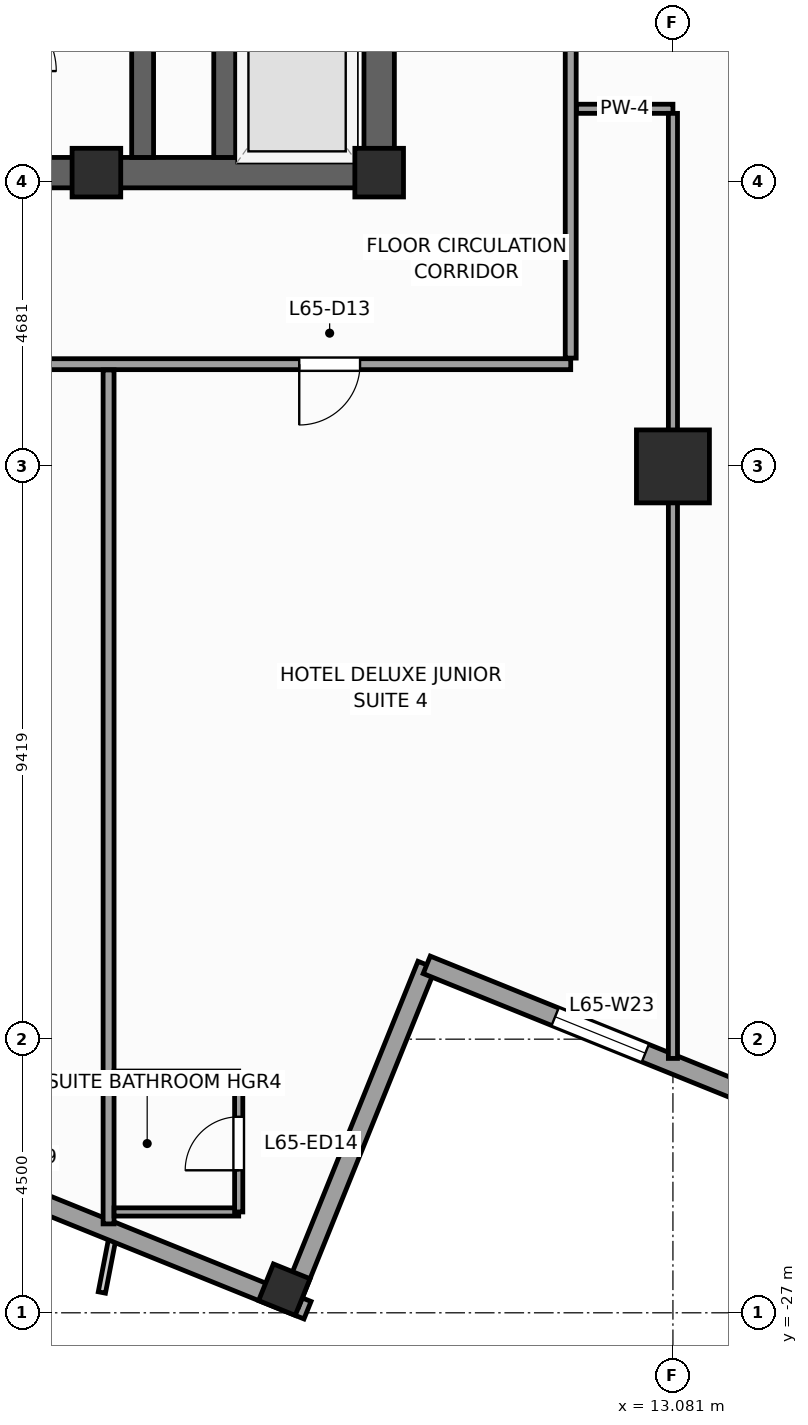
"""IFC4 building model, lengths in metres.
Left out: names, types, materials, properties, quantities, classifications, styles, units other than length and angle.
Written with IfcOpenShell. Run it as: python <this file> out.ifc"""

import sys

from ifc_helpers import new_model, si_unit, direction, frame, frame_2d, origin, origin_2d, place, context, subcontext, project, spatial, rectangle, extrude, source, transform, mapped, element, fill, save


model = new_model("IFC4")
c1 = context("Model", 3, precision=1e-05, world=origin(), true_north=direction((0.0, 1.0)))
c2 = subcontext(c1, "Body", "Model", "MODEL_VIEW")
j1 = project(units=[si_unit("LENGTHUNIT", "METRE"), si_unit("PLANEANGLEUNIT", "RADIAN")], contexts=[c1])
p1 = place(None, origin())
s1 = spatial("IfcSite", under=j1, at=p1, CompositionType="ELEMENT")
p2 = place(p1, origin())
s2 = spatial("IfcBuilding", under=s1, at=p2, CompositionType="ELEMENT")
p3 = place(p2, frame((0.0, 0.0, 268.8)))
s3 = spatial("IfcBuildingStorey", under=s2, at=p3, CompositionType="ELEMENT", Elevation=268.8)
p4 = place(p3, frame((-8.5, -8.25, 0.0), z_axis=(0.0, 0.0, 1.0), x_axis=(1.0, 0.0, 0.0)))
e1 = element("IfcWall", 1, at=p4, inside=s3, PredefinedType="SHEAR", context=c2, shape_type="SweptSolid", body=[
    extrude(rectangle(XDim=17.0, YDim=0.5, at=frame_2d((8.5, 0.0))), origin(), (0.0, 0.0, 1.0), 3.6),
])
p5 = place(p4, frame((7.85, 0.0, 0.0)))
e2 = element("IfcOpeningElement", 2, at=p5, cuts=e1, PredefinedType="OPENING", context=c2, shape_type="SweptSolid", body=[
    extrude(rectangle(XDim=1.3, YDim=2.2, at=frame_2d((0.65, 1.1))), frame((0.0, 0.26, 0.0), z_axis=(0.0, -1.0, 0.0), x_axis=(1.0, 0.0, 0.0)), (0.0, 0.0, 1.0), 0.52),
])
p6 = place(p3, frame((8.25, -8.0, 0.0), z_axis=(0.0, 0.0, 1.0), x_axis=(0.0, 1.0, 0.0)))
e3 = element("IfcWall", 3, at=p6, inside=s3, PredefinedType="SHEAR", context=c2, shape_type="SweptSolid", body=[
    extrude(rectangle(XDim=16.0, YDim=0.5, at=frame_2d((8.0, 0.0))), origin(), (0.0, 0.0, 1.0), 3.6),
])
p7 = place(p6, frame((4.69, 0.0, 0.0)))
e4 = element("IfcOpeningElement", 4, at=p7, cuts=e3, PredefinedType="OPENING", context=c2, shape_type="SweptSolid", body=[
    extrude(rectangle(XDim=1.3, YDim=2.2, at=frame_2d((0.65, 1.1))), frame((0.0, 0.26, 0.0), z_axis=(0.0, -1.0, 0.0), x_axis=(1.0, 0.0, 0.0)), (0.0, 0.0, 1.0), 0.52),
])
p8 = place(p3, frame((4.36, -8.0, 0.0), z_axis=(0.0, 0.0, 1.0), x_axis=(0.0, 1.0, 0.0)))
e5 = element("IfcWall", 5, at=p8, inside=s3, PredefinedType="SHEAR", context=c2, shape_type="SweptSolid", body=[
    extrude(rectangle(XDim=16.0, YDim=0.36, at=frame_2d((8.0, 0.0))), origin(), (0.0, 0.0, 1.0), 3.6),
])
p9 = place(p3, frame((5.71, -8.0, 0.0), z_axis=(0.0, 0.0, 1.0), x_axis=(0.0, 1.0, 0.0)))
e6 = element("IfcWall", 6, at=p9, inside=s3, PredefinedType="SHEAR", context=c2, shape_type="SweptSolid", body=[
    extrude(rectangle(XDim=2.54, YDim=0.36, at=frame_2d((1.27, 0.0))), origin(), (0.0, 0.0, 1.0), 3.6),
])
m1 = source(origin(), c2, "Body", "SweptSolid", [
    extrude(rectangle(XDim=0.8, YDim=0.8, at=origin_2d()), origin(), (0.0, 0.0, 1.0), 3.6),
])
for number, where, z_axis, x_axis in (
    (7, (8.25, -8.25, 0.0), (0.0, 0.0, 1.0), (1.0, 0.0, 0.0)),
    (8, (3.6, -8.25, 0.0), (0.0, 0.0, 1.0), (1.0, 0.0, 0.0)),
):
    element("IfcColumn", number, at=place(p3, frame(where, z_axis=z_axis, x_axis=x_axis)), inside=s3, PredefinedType="PILASTER", context=c2, shape_type="MappedRepresentation", body=[
        mapped(m1, transform((0.0, 0.0, 0.0), scale=1.0)),
    ])
m2 = source(origin(), c2, "Body", "SweptSolid", [
    extrude(rectangle(XDim=1.2, YDim=1.2, at=origin_2d()), origin(), (0.0, 0.0, 1.0), 3.6),
])
p10 = place(p3, frame((13.081, -13.081, 0.0), z_axis=(0.0, 0.0, 1.0), x_axis=(1.0, 0.0, 0.0)))
e9 = element("IfcColumn", 9, at=p10, inside=s3, PredefinedType="COLUMN", context=c2, shape_type="MappedRepresentation", body=[
    mapped(m2, transform((0.0, 0.0, 0.0), scale=1.0)),
])
m3 = source(origin(), c2, "Body", "SweptSolid", [
    extrude(rectangle(XDim=0.65, YDim=0.65, at=origin_2d()), origin(), (0.0, 0.0, 1.0), 3.6),
])
p11 = place(p3, frame((6.69, -26.62, 0.0), z_axis=(0.0, 0.0, 1.0), x_axis=(0.374606593416, 0.927183854567, 0.0)))
e10 = element("IfcColumn", 10, at=p11, inside=s3, PredefinedType="COLUMN", context=c2, shape_type="MappedRepresentation", body=[
    mapped(m3, transform((0.0, 0.0, 0.0), scale=1.0)),
])
p12 = place(p3, frame((-23.813, -14.479, 0.0), z_axis=(0.0, 0.0, 1.0), x_axis=(0.927182657188, -0.374609557019, 0.0)))
e11 = element("IfcWall", 11, at=p12, inside=s3, PredefinedType="STANDARD", context=c2, shape_type="SweptSolid", body=[
    extrude(rectangle(XDim=33.31, YDim=0.31, at=frame_2d((16.655, 0.0))), origin(), (0.0, 0.0, 1.0), 2.75),
])
p13 = place(p12, frame((3.197, 0.0, 0.47)))
e12 = element("IfcOpeningElement", 12, at=p13, cuts=e11, PredefinedType="OPENING", context=c2, shape_type="SweptSolid", body=[
    extrude(rectangle(XDim=1.6, YDim=2.1, at=frame_2d((0.8, 1.05))), frame((0.0, 0.165, 0.0), z_axis=(0.0, -1.0, 0.0), x_axis=(1.0, 0.0, 0.0)), (0.0, 0.0, 1.0), 0.33),
])
p14 = place(p12, frame((8.86, 0.0, 0.47)))
e13 = element("IfcOpeningElement", 13, at=p14, cuts=e11, PredefinedType="OPENING", context=c2, shape_type="SweptSolid", body=[
    extrude(rectangle(XDim=1.6, YDim=2.1, at=frame_2d((0.8, 1.05))), frame((0.0, 0.165, 0.0), z_axis=(0.0, -1.0, 0.0), x_axis=(1.0, 0.0, 0.0)), (0.0, 0.0, 1.0), 0.33),
])
p15 = place(p12, frame((14.439, 0.0, 0.47)))
e14 = element("IfcOpeningElement", 14, at=p15, cuts=e11, PredefinedType="OPENING", context=c2, shape_type="SweptSolid", body=[
    extrude(rectangle(XDim=1.6, YDim=2.1, at=frame_2d((0.8, 1.05))), frame((0.0, 0.165, 0.0), z_axis=(0.0, -1.0, 0.0), x_axis=(1.0, 0.0, 0.0)), (0.0, 0.0, 1.0), 0.33),
])
p16 = place(p12, frame((22.601, 0.0, 0.47)))
e15 = element("IfcOpeningElement", 15, at=p16, cuts=e11, PredefinedType="OPENING", context=c2, shape_type="SweptSolid", body=[
    extrude(rectangle(XDim=1.6, YDim=2.1, at=frame_2d((0.8, 1.05))), frame((0.0, 0.165, 0.0), z_axis=(0.0, -1.0, 0.0), x_axis=(1.0, 0.0, 0.0)), (0.0, 0.0, 1.0), 0.33),
])
p17 = place(p12, frame((27.097, 0.0, 0.47)))
e16 = element("IfcOpeningElement", 16, at=p17, cuts=e11, PredefinedType="OPENING", context=c2, shape_type="SweptSolid", body=[
    extrude(rectangle(XDim=1.6, YDim=2.1, at=frame_2d((0.8, 1.05))), frame((0.0, 0.165, 0.0), z_axis=(0.0, -1.0, 0.0), x_axis=(1.0, 0.0, 0.0)), (0.0, 0.0, 1.0), 0.33),
])
p18 = place(p3, frame((6.784, -26.841, 0.0), z_axis=(0.0, 0.0, 1.0), x_axis=(0.374636620962, 0.927171722085, 0.0)))
e17 = element("IfcWall", 17, at=p18, inside=s3, PredefinedType="STANDARD", context=c2, shape_type="SweptSolid", body=[
    extrude(rectangle(XDim=6.0, YDim=0.31, at=frame_2d((3.0, 0.0))), origin(), (0.0, 0.0, 1.0), 2.65),
])
p19 = place(p3, frame((9.032, -21.278, 0.0), z_axis=(0.0, 0.0, 1.0), x_axis=(0.927185411764, -0.374602739196, 0.0)))
e18 = element("IfcWall", 18, at=p19, inside=s3, PredefinedType="STANDARD", context=c2, shape_type="SweptSolid", body=[
    extrude(rectangle(XDim=6.155, YDim=0.31, at=frame_2d((3.078, 0.0))), origin(), (0.0, 0.0, 1.0), 3.35),
])
p20 = place(p19, frame((2.278, 0.0, 0.47)))
e19 = element("IfcOpeningElement", 19, at=p20, cuts=e18, PredefinedType="OPENING", context=c2, shape_type="SweptSolid", body=[
    extrude(rectangle(XDim=1.6, YDim=2.1, at=frame_2d((0.8, 1.05))), frame((0.0, 0.165, 0.0), z_axis=(0.0, -1.0, 0.0), x_axis=(1.0, 0.0, 0.0)), (0.0, 0.0, 1.0), 0.33),
])
p21 = place(p3, frame((-10.3, -11.4, 0.0), z_axis=(0.0, 0.0, 1.0), x_axis=(1.0, 0.0, 0.0)))
e20 = element("IfcWall", 20, at=p21, inside=s3, PredefinedType="PARTITIONING", context=c2, shape_type="SweptSolid", body=[
    extrude(rectangle(XDim=21.7, YDim=0.18, at=frame_2d((10.85, 0.0))), origin(), (0.0, 0.0, 1.0), 3.35),
])
p22 = place(p21, frame((1.605, 0.0, 0.0)))
e21 = element("IfcOpeningElement", 21, at=p22, cuts=e20, PredefinedType="OPENING", context=c2, shape_type="SweptSolid", body=[
    extrude(rectangle(XDim=0.95, YDim=2.1, at=frame_2d((0.475, 1.05))), frame((0.0, 0.1, 0.0), z_axis=(0.0, -1.0, 0.0), x_axis=(1.0, 0.0, 0.0)), (0.0, 0.0, 1.0), 0.2),
])
p23 = place(p21, frame((17.236, 0.0, 0.0)))
e22 = element("IfcOpeningElement", 22, at=p23, cuts=e20, PredefinedType="OPENING", context=c2, shape_type="SweptSolid", body=[
    extrude(rectangle(XDim=1.0, YDim=2.15, at=frame_2d((0.5, 1.075))), frame((0.0, 0.1, 0.0), z_axis=(0.0, -1.0, 0.0), x_axis=(1.0, 0.0, 0.0)), (0.0, 0.0, 1.0), 0.2),
])
p24 = place(p21, frame((9.8, 0.0, 0.0)))
e23 = element("IfcOpeningElement", 23, at=p24, cuts=e20, PredefinedType="OPENING", context=c2, shape_type="SweptSolid", body=[
    extrude(rectangle(XDim=1.0, YDim=2.15, at=frame_2d((0.5, 1.075))), frame((0.0, 0.1, 0.0), z_axis=(0.0, -1.0, 0.0), x_axis=(1.0, 0.0, 0.0)), (0.0, 0.0, 1.0), 0.2),
])
p25 = place(p3, frame((11.4, -11.3, 0.0), z_axis=(0.0, 0.0, 1.0), x_axis=(0.0, 1.0, 0.0)))
e24 = element("IfcWall", 24, at=p25, inside=s3, PredefinedType="PARTITIONING", context=c2, shape_type="SweptSolid", body=[
    extrude(rectangle(XDim=21.5, YDim=0.18, at=frame_2d((10.75, 0.0))), origin(), (0.0, 0.0, 1.0), 3.35),
])
p26 = place(p25, frame((17.536, 0.0, 0.0)))
e25 = element("IfcOpeningElement", 25, at=p26, cuts=e24, PredefinedType="OPENING", context=c2, shape_type="SweptSolid", body=[
    extrude(rectangle(XDim=1.0, YDim=2.15, at=frame_2d((0.5, 1.075))), frame((0.0, 0.1, 0.0), z_axis=(0.0, -1.0, 0.0), x_axis=(1.0, 0.0, 0.0)), (0.0, 0.0, 1.0), 0.2),
])
p27 = place(p25, frame((10.8, 0.0, 0.0)))
e26 = element("IfcOpeningElement", 26, at=p27, cuts=e24, PredefinedType="OPENING", context=c2, shape_type="SweptSolid", body=[
    extrude(rectangle(XDim=1.0, YDim=2.15, at=frame_2d((0.5, 1.075))), frame((0.0, 0.1, 0.0), z_axis=(0.0, -1.0, 0.0), x_axis=(1.0, 0.0, 0.0)), (0.0, 0.0, 1.0), 0.2),
])
p28 = place(p25, frame((5.4, 0.0, 0.0)))
e27 = element("IfcOpeningElement", 27, at=p28, cuts=e24, PredefinedType="OPENING", context=c2, shape_type="SweptSolid", body=[
    extrude(rectangle(XDim=1.0, YDim=2.15, at=frame_2d((0.5, 1.075))), frame((0.0, 0.1, 0.0), z_axis=(0.0, -1.0, 0.0), x_axis=(1.0, 0.0, 0.0)), (0.0, 0.0, 1.0), 0.2),
])
p29 = place(p3, frame((3.8, -11.495, 0.0), z_axis=(0.0, 0.0, 1.0), x_axis=(0.0, -1.0, 0.0)))
e28 = element("IfcWall", 28, at=p29, inside=s3, PredefinedType="PARTITIONING", context=c2, shape_type="SweptSolid", body=[
    extrude(rectangle(XDim=14.043, YDim=0.18, at=frame_2d((7.021, 0.0))), origin(), (0.0, 0.0, 1.0), 3.35),
])
p30 = place(p3, frame((11.495, -7.2, 0.0), z_axis=(0.0, 0.0, 1.0), x_axis=(1.0, 0.0, 0.0)))
e29 = element("IfcWall", 29, at=p30, inside=s3, PredefinedType="PARTITIONING", context=c2, shape_type="SweptSolid", body=[
    extrude(rectangle(XDim=1.586, YDim=0.15, at=frame_2d((0.793, 0.0))), origin(), (0.0, 0.0, 1.0), 3.35),
])
p31 = place(p3, frame((13.081, -7.275, 0.0), z_axis=(0.0, 0.0, 1.0), x_axis=(0.0, -1.0, 0.0)))
e30 = element("IfcWall", 30, at=p31, inside=s3, PredefinedType="PARTITIONING", context=c2, shape_type="SweptSolid", body=[
    extrude(rectangle(XDim=15.542, YDim=0.15, at=frame_2d((7.771, 0.0))), origin(), (0.0, 0.0, 1.0), 2.45),
])
p32 = place(p3, frame((3.89, -25.342, 0.0), z_axis=(0.0, 0.0, 1.0), x_axis=(1.0, 0.0, 0.0)))
e31 = element("IfcWall", 31, at=p32, inside=s3, PredefinedType="PARTITIONING", context=c2, shape_type="SweptSolid", body=[
    extrude(rectangle(XDim=2.05, YDim=0.135, at=frame_2d((1.025, 0.0))), origin(), (0.0, 0.0, 1.0), 2.75),
])
p33 = place(p3, frame((5.94, -25.342, 0.0), z_axis=(0.0, 0.0, 1.0), x_axis=(0.0, 1.0, 0.0)))
e32 = element("IfcWall", 32, at=p33, inside=s3, PredefinedType="PARTITIONING", context=c2, shape_type="SweptSolid", body=[
    extrude(rectangle(XDim=2.25, YDim=0.135, at=frame_2d((1.125, 0.0))), origin(), (0.0, 0.0, 1.0), 3.35),
])
p34 = place(p33, frame((0.685, 0.0, 0.0)))
e33 = element("IfcOpeningElement", 33, at=p34, cuts=e32, PredefinedType="OPENING", context=c2, shape_type="SweptSolid", body=[
    extrude(rectangle(XDim=0.88, YDim=2.1, at=frame_2d((0.44, 1.05))), frame((0.0, 0.078, 0.0), z_axis=(0.0, -1.0, 0.0), x_axis=(1.0, 0.0, 0.0)), (0.0, 0.0, 1.0), 0.155),
])
p35 = place(p3, frame((3.89, -23.092, 0.0), z_axis=(0.0, 0.0, 1.0), x_axis=(1.0, 0.0, 0.0)))
e34 = element("IfcWall", 34, at=p35, inside=s3, PredefinedType="PARTITIONING", context=c2, shape_type="SweptSolid", body=[
    extrude(rectangle(XDim=2.05, YDim=0.135, at=frame_2d((1.025, 0.0))), origin(), (0.0, 0.0, 1.0), 2.95),
])
m4 = source(origin(), c2, "Body", "SweptSolid", [
    extrude(rectangle(XDim=1.6, YDim=2.1, at=frame_2d((0.8, 1.05))), frame((0.0, 0.03, 0.0), z_axis=(0.0, -1.0, 0.0), x_axis=(1.0, 0.0, 0.0)), (0.0, 0.0, 1.0), 0.06),
])
p36 = place(p20, origin())
e35 = element("IfcWindow", 35, at=p36, inside=s3, PartitioningType="SINGLE_PANEL", PredefinedType="WINDOW", context=c2, shape_type="MappedRepresentation", body=[
    mapped(m4, transform((0.0, 0.0, 0.0), scale=1.0)),
])
fill(e19, e35)
m5 = source(origin(), c2, "Body", "SweptSolid", [
    extrude(rectangle(XDim=1.0, YDim=2.15, at=frame_2d((0.5, 1.075))), frame((0.0, 0.025, 0.0), z_axis=(0.0, -1.0, 0.0), x_axis=(1.0, 0.0, 0.0)), (0.0, 0.0, 1.0), 0.05),
])
p37 = place(p23, frame((1.0, 0.0, 0.0), z_axis=(0.0, 0.0, 1.0), x_axis=(-1.0, 0.0, 0.0)))
e36 = element("IfcDoor", 36, at=p37, inside=s3, OperationType="SINGLE_SWING_LEFT", PredefinedType="DOOR", context=c2, shape_type="MappedRepresentation", body=[
    mapped(m5, transform((0.0, 0.0, 0.0), scale=1.0)),
])
fill(e22, e36)
m6 = source(origin(), c2, "Body", "SweptSolid", [
    extrude(rectangle(XDim=0.88, YDim=2.1, at=frame_2d((0.44, 1.05))), frame((0.0, 0.025, 0.0), z_axis=(0.0, -1.0, 0.0), x_axis=(1.0, 0.0, 0.0)), (0.0, 0.0, 1.0), 0.05),
])
p38 = place(p34, origin())
e37 = element("IfcDoor", 37, at=p38, inside=s3, OperationType="SINGLE_SWING_LEFT", PredefinedType="DOOR", context=c2, shape_type="MappedRepresentation", body=[
    mapped(m6, transform((0.0, 0.0, 0.0), scale=1.0)),
])
fill(e33, e37)
save(model, sys.argv[1])
